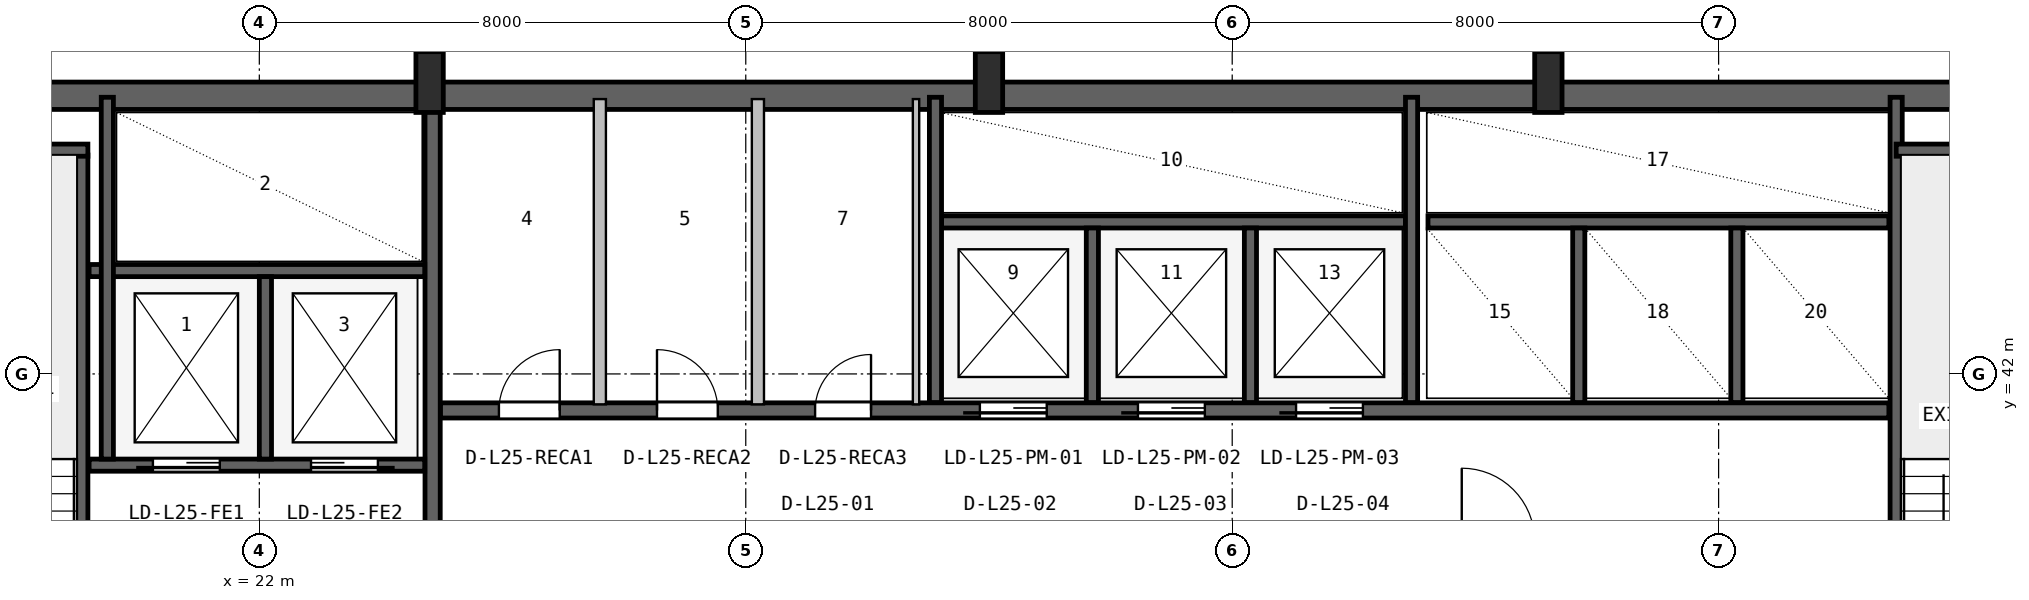
"""IFC4 building model, lengths in metres.
Left out: names, types, materials, properties, quantities, classifications, styles, units other than length and angle.
Written with IfcOpenShell. Run it as: python <this file> out.ifc"""

import sys

from ifc_helpers import new_model, si_unit, direction, frame, frame_2d, origin, origin_2d, place, context, subcontext, project, spatial, rectangle, i_section, extrude, source, transform, mapped, element, fill, save


model = new_model("IFC4")
c1 = context("Model", 3, precision=1e-05, world=origin(), true_north=direction((0.0, 1.0)))
c2 = subcontext(c1, "Body", "Model", "MODEL_VIEW")
j1 = project(units=[si_unit("LENGTHUNIT", "METRE"), si_unit("PLANEANGLEUNIT", "RADIAN")], contexts=[c1])
p1 = place(None, origin())
s1 = spatial("IfcSite", under=j1, at=p1, CompositionType="ELEMENT")
p2 = place(p1, origin())
s2 = spatial("IfcBuilding", under=s1, at=p2, CompositionType="ELEMENT")
p3 = place(p2, frame((0.0, 0.0, 106.8)))
s3 = spatial("IfcBuildingStorey", under=s2, at=p3, CompositionType="ELEMENT", Elevation=106.8)
p4 = place(p3, frame((15.6, 46.575, 0.0), z_axis=(0.0, 0.0, 1.0), x_axis=(1.0, 0.0, 0.0)))
e1 = element("IfcWall", 1, at=p4, inside=s3, PredefinedType="SHEAR", context=c2, shape_type="SweptSolid", body=[
    extrude(rectangle(XDim=36.8, YDim=0.45, at=frame_2d((18.4, 0.0))), origin(), (0.0, 0.0, 1.0), 3.55),
])
m1 = source(origin(), c2, "Body", "SweptSolid", [
    extrude(i_section(OverallWidth=0.45, OverallDepth=1.0, WebThickness=0.016, FlangeThickness=0.03, FilletRadius=0.016, at=origin_2d()), origin(), (0.0, 0.0, 1.0), 3.8),
])
for number, where, z_axis, x_axis in (
    (2, (24.8, 46.8, 0.0), (0.0, 0.0, 1.0), (1.0, 0.0, 0.0)),
    (3, (34.0, 46.8, 0.0), (0.0, 0.0, 1.0), (1.0, 0.0, 0.0)),
    (4, (43.2, 46.8, 0.0), (0.0, 0.0, 1.0), (1.0, 0.0, 0.0)),
):
    element("IfcColumn", number, at=place(p3, frame(where, z_axis=z_axis, x_axis=x_axis)), inside=s3, PredefinedType="COLUMN", context=c2, shape_type="MappedRepresentation", body=[
        mapped(m1, transform((0.0, 0.0, 0.0), x_axis=(1.0, 0.0, 0.0), y_axis=(0.0, 1.0, 0.0), z_axis=(0.0, 0.0, 1.0), scale=1.0)),
    ])
p5 = place(p3, frame((19.08, 35.95, 0.0), z_axis=(0.0, 0.0, 1.0), x_axis=(0.0, 1.0, 0.0)))
e5 = element("IfcWall", 5, at=p5, inside=s3, PredefinedType="SHEAR", context=c2, shape_type="SweptSolid", body=[
    extrude(rectangle(XDim=9.65, YDim=0.2, at=frame_2d((4.825, 0.0))), origin(), (0.0, 0.0, 1.0), 3.55),
])
p6 = place(p5, frame((0.25, 0.0, 0.0)))
e6 = element("IfcOpeningElement", 6, at=p6, cuts=e5, PredefinedType="OPENING", context=c2, shape_type="SweptSolid", body=[
    extrude(rectangle(XDim=0.95, YDim=2.1, at=frame_2d((0.475, 1.05))), frame((0.0, 0.11, 0.0), z_axis=(0.0, -1.0, 0.0), x_axis=(1.0, 0.0, 0.0)), (0.0, 0.0, 1.0), 0.22),
])
p7 = place(p3, frame((15.95, 45.68, 0.0), z_axis=(0.0, 0.0, 1.0), x_axis=(1.0, 0.0, 0.0)))
e7 = element("IfcWall", 7, at=p7, inside=s3, PredefinedType="SHEAR", context=c2, shape_type="SweptSolid", body=[
    extrude(rectangle(XDim=3.23, YDim=0.2, at=frame_2d((1.615, 0.0))), origin(), (0.0, 0.0, 1.0), 3.55),
])
p8 = place(p3, frame((24.85, 36.05, 0.0), z_axis=(0.0, 0.0, 1.0), x_axis=(0.0, 1.0, 0.0)))
e8 = element("IfcWall", 8, at=p8, inside=s3, PredefinedType="SHEAR", context=c2, shape_type="SweptSolid", body=[
    extrude(rectangle(XDim=10.45, YDim=0.25, at=frame_2d((5.225, 0.0))), origin(), (0.0, 0.0, 1.0), 3.55),
])
p9 = place(p3, frame((19.2, 40.5, 0.0), z_axis=(0.0, 0.0, 1.0), x_axis=(1.0, 0.0, 0.0)))
e9 = element("IfcWall", 9, at=p9, inside=s3, PredefinedType="SHEAR", context=c2, shape_type="SweptSolid", body=[
    extrude(rectangle(XDim=5.52, YDim=0.2, at=frame_2d((2.76, 0.0))), origin(), (0.0, 0.0, 1.0), 3.55),
])
p10 = place(p9, frame((1.05, 0.0, 0.0)))
e10 = element("IfcOpeningElement", 10, at=p10, cuts=e9, PredefinedType="OPENING", context=c2, shape_type="SweptSolid", body=[
    extrude(rectangle(XDim=1.1, YDim=2.18, at=frame_2d((0.55, 1.09))), frame((0.0, 0.11, 0.0), z_axis=(0.0, -1.0, 0.0), x_axis=(1.0, 0.0, 0.0)), (0.0, 0.0, 1.0), 0.22),
])
p11 = place(p9, frame((3.65, 0.0, 0.0)))
e11 = element("IfcOpeningElement", 11, at=p11, cuts=e9, PredefinedType="OPENING", context=c2, shape_type="SweptSolid", body=[
    extrude(rectangle(XDim=1.1, YDim=2.18, at=frame_2d((0.55, 1.09))), frame((0.0, 0.11, 0.0), z_axis=(0.0, -1.0, 0.0), x_axis=(1.0, 0.0, 0.0)), (0.0, 0.0, 1.0), 0.22),
])
p12 = place(p3, frame((19.2, 43.7, 0.0), z_axis=(0.0, 0.0, 1.0), x_axis=(1.0, 0.0, 0.0)))
e12 = element("IfcWall", 12, at=p12, inside=s3, PredefinedType="SHEAR", context=c2, shape_type="SweptSolid", body=[
    extrude(rectangle(XDim=5.52, YDim=0.2, at=frame_2d((2.76, 0.0))), origin(), (0.0, 0.0, 1.0), 3.55),
])
p13 = place(p3, frame((22.1, 40.6, 0.0), z_axis=(0.0, 0.0, 1.0), x_axis=(0.0, 1.0, 0.0)))
e13 = element("IfcWall", 13, at=p13, inside=s3, PredefinedType="SHEAR", context=c2, shape_type="SweptSolid", body=[
    extrude(rectangle(XDim=3.0, YDim=0.2, at=frame_2d((1.5, 0.0))), origin(), (0.0, 0.0, 1.0), 3.55),
])
p14 = place(p3, frame((19.5, 40.6, 0.0), z_axis=(0.0, 0.0, 1.0), x_axis=(0.0, 1.0, 0.0)))
e14 = element("IfcWall", 14, at=p14, inside=s3, PredefinedType="SHEAR", context=c2, shape_type="SweptSolid", body=[
    extrude(rectangle(XDim=5.95, YDim=0.2, at=frame_2d((2.975, 0.0))), origin(), (0.0, 0.0, 1.0), 3.55),
])
p15 = place(p3, frame((48.92, 36.05, 0.0), z_axis=(0.0, 0.0, 1.0), x_axis=(0.0, 1.0, 0.0)))
e15 = element("IfcWall", 15, at=p15, inside=s3, PredefinedType="SHEAR", context=c2, shape_type="SweptSolid", body=[
    extrude(rectangle(XDim=10.5, YDim=0.2, at=frame_2d((5.25, 0.0))), origin(), (0.0, 0.0, 1.0), 3.55),
])
p16 = place(p3, frame((48.92, 45.68, 0.0), z_axis=(0.0, 0.0, 1.0), x_axis=(1.0, 0.0, 0.0)))
e16 = element("IfcWall", 16, at=p16, inside=s3, PredefinedType="SHEAR", context=c2, shape_type="SweptSolid", body=[
    extrude(rectangle(XDim=3.18, YDim=0.2, at=frame_2d((1.59, 0.0))), origin(), (0.0, 0.0, 1.0), 3.55),
])
p17 = place(p3, frame((24.98, 41.4, 0.0), z_axis=(0.0, 0.0, 1.0), x_axis=(1.0, 0.0, 0.0)))
e17 = element("IfcWall", 17, at=p17, inside=s3, PredefinedType="SHEAR", context=c2, shape_type="SweptSolid", body=[
    extrude(rectangle(XDim=23.82, YDim=0.25, at=frame_2d((11.91, 0.0))), origin(), (0.0, 0.0, 1.0), 3.55),
])
p18 = place(p17, frame((8.87, 0.0, 0.0)))
e18 = element("IfcOpeningElement", 18, at=p18, cuts=e17, PredefinedType="OPENING", context=c2, shape_type="SweptSolid", body=[
    extrude(rectangle(XDim=1.1, YDim=2.18, at=frame_2d((0.55, 1.09))), frame((0.0, 0.135, 0.0), z_axis=(0.0, -1.0, 0.0), x_axis=(1.0, 0.0, 0.0)), (0.0, 0.0, 1.0), 0.27),
])
p19 = place(p17, frame((11.47, 0.0, 0.0)))
e19 = element("IfcOpeningElement", 19, at=p19, cuts=e17, PredefinedType="OPENING", context=c2, shape_type="SweptSolid", body=[
    extrude(rectangle(XDim=1.1, YDim=2.18, at=frame_2d((0.55, 1.09))), frame((0.0, 0.135, 0.0), z_axis=(0.0, -1.0, 0.0), x_axis=(1.0, 0.0, 0.0)), (0.0, 0.0, 1.0), 0.27),
])
p20 = place(p17, frame((14.07, 0.0, 0.0)))
e20 = element("IfcOpeningElement", 20, at=p20, cuts=e17, PredefinedType="OPENING", context=c2, shape_type="SweptSolid", body=[
    extrude(rectangle(XDim=1.1, YDim=2.18, at=frame_2d((0.55, 1.09))), frame((0.0, 0.135, 0.0), z_axis=(0.0, -1.0, 0.0), x_axis=(1.0, 0.0, 0.0)), (0.0, 0.0, 1.0), 0.27),
])
p21 = place(p17, frame((0.96, 0.0, 0.0)))
e21 = element("IfcOpeningElement", 21, at=p21, cuts=e17, PredefinedType="OPENING", context=c2, shape_type="SweptSolid", body=[
    extrude(rectangle(XDim=1.0, YDim=2.08, at=frame_2d((0.5, 1.04))), frame((0.0, 0.135, 0.0), z_axis=(0.0, -1.0, 0.0), x_axis=(1.0, 0.0, 0.0)), (0.0, 0.0, 1.0), 0.27),
])
p22 = place(p17, frame((3.56, 0.0, 0.0)))
e22 = element("IfcOpeningElement", 22, at=p22, cuts=e17, PredefinedType="OPENING", context=c2, shape_type="SweptSolid", body=[
    extrude(rectangle(XDim=1.0, YDim=2.08, at=frame_2d((0.5, 1.04))), frame((0.0, 0.135, 0.0), z_axis=(0.0, -1.0, 0.0), x_axis=(1.0, 0.0, 0.0)), (0.0, 0.0, 1.0), 0.27),
])
p23 = place(p17, frame((6.16, 0.0, 0.0)))
e23 = element("IfcOpeningElement", 23, at=p23, cuts=e17, PredefinedType="OPENING", context=c2, shape_type="SweptSolid", body=[
    extrude(rectangle(XDim=0.92, YDim=2.08, at=frame_2d((0.46, 1.04))), frame((0.0, 0.135, 0.0), z_axis=(0.0, -1.0, 0.0), x_axis=(1.0, 0.0, 0.0)), (0.0, 0.0, 1.0), 0.27),
])
p24 = place(p3, frame((33.22, 44.5, 0.0), z_axis=(0.0, 0.0, 1.0), x_axis=(1.0, 0.0, 0.0)))
e24 = element("IfcWall", 24, at=p24, inside=s3, PredefinedType="SHEAR", context=c2, shape_type="SweptSolid", body=[
    extrude(rectangle(XDim=7.63, YDim=0.2, at=frame_2d((3.815, 0.0))), origin(), (0.0, 0.0, 1.0), 3.55),
])
p25 = place(p3, frame((33.12, 41.53, 0.0), z_axis=(0.0, 0.0, 1.0), x_axis=(0.0, 1.0, 0.0)))
e25 = element("IfcWall", 25, at=p25, inside=s3, PredefinedType="SHEAR", context=c2, shape_type="SweptSolid", body=[
    extrude(rectangle(XDim=5.02, YDim=0.2, at=frame_2d((2.51, 0.0))), origin(), (0.0, 0.0, 1.0), 3.55),
])
for number, where, z_axis, x_axis in (
    (26, (35.7, 41.53, 0.0), (0.0, 0.0, 1.0), (0.0, 1.0, 0.0)),
    (27, (38.3, 41.53, 0.0), (0.0, 0.0, 1.0), (0.0, 1.0, 0.0)),
):
    element("IfcWall", number, at=place(p3, frame(where, z_axis=z_axis, x_axis=x_axis)), inside=s3, PredefinedType="SHEAR", context=c2, shape_type="SweptSolid", body=[
        extrude(rectangle(XDim=2.87, YDim=0.2, at=frame_2d((1.435, 0.0))), origin(), (0.0, 0.0, 1.0), 3.55),
    ])
p26 = place(p3, frame((40.95, 41.53, 0.0), z_axis=(0.0, 0.0, 1.0), x_axis=(0.0, 1.0, 0.0)))
e28 = element("IfcWall", 28, at=p26, inside=s3, PredefinedType="SHEAR", context=c2, shape_type="SweptSolid", body=[
    extrude(rectangle(XDim=5.02, YDim=0.2, at=frame_2d((2.51, 0.0))), origin(), (0.0, 0.0, 1.0), 3.55),
])
p27 = place(p3, frame((41.22, 44.5, 0.0), z_axis=(0.0, 0.0, 1.0), x_axis=(1.0, 0.0, 0.0)))
e29 = element("IfcWall", 29, at=p27, inside=s3, PredefinedType="SHEAR", context=c2, shape_type="SweptSolid", body=[
    extrude(rectangle(XDim=7.58, YDim=0.2, at=frame_2d((3.79, 0.0))), origin(), (0.0, 0.0, 1.0), 3.55),
])
for number, where, z_axis, x_axis in (
    (30, (43.7, 41.53, 0.0), (0.0, 0.0, 1.0), (0.0, 1.0, 0.0)),
    (31, (46.3, 41.53, 0.0), (0.0, 0.0, 1.0), (0.0, 1.0, 0.0)),
):
    element("IfcWall", number, at=place(p3, frame(where, z_axis=z_axis, x_axis=x_axis)), inside=s3, PredefinedType="SHEAR", context=c2, shape_type="SweptSolid", body=[
        extrude(rectangle(XDim=2.87, YDim=0.2, at=frame_2d((1.435, 0.0))), origin(), (0.0, 0.0, 1.0), 3.55),
    ])
for number, where, z_axis, x_axis in (
    (32, (27.6, 41.5, 0.0), (0.0, 0.0, 1.0), (0.0, 1.0, 0.0)),
    (33, (30.2, 41.5, 0.0), (0.0, 0.0, 1.0), (0.0, 1.0, 0.0)),
):
    element("IfcWall", number, at=place(p3, frame(where, z_axis=z_axis, x_axis=x_axis)), inside=s3, PredefinedType="SOLIDWALL", context=c2, shape_type="SweptSolid", body=[
        extrude(rectangle(XDim=5.02, YDim=0.2, at=frame_2d((2.51, 0.0))), origin(), (0.0, 0.0, 1.0), 3.53),
    ])
p28 = place(p3, frame((32.8, 41.5, 0.0), z_axis=(0.0, 0.0, 1.0), x_axis=(0.0, 1.0, 0.0)))
e34 = element("IfcWall", 34, at=p28, inside=s3, PredefinedType="PARTITIONING", context=c2, shape_type="SweptSolid", body=[
    extrude(rectangle(XDim=5.02, YDim=0.105, at=frame_2d((2.51, 0.0))), origin(), (0.0, 0.0, 1.0), 3.53),
])
m2 = source(origin(), c2, "Body", "SweptSolid", [
    extrude(rectangle(XDim=1.1, YDim=2.18, at=frame_2d((0.55, 1.09))), frame((0.0, 0.025, 0.0), z_axis=(0.0, -1.0, 0.0), x_axis=(1.0, 0.0, 0.0)), (0.0, 0.0, 1.0), 0.05),
])
p29 = place(p10, frame((1.1, 0.0, 0.0), z_axis=(0.0, 0.0, 1.0), x_axis=(-1.0, 0.0, 0.0)))
e35 = element("IfcDoor", 35, at=p29, inside=s3, OperationType="SLIDING_TO_LEFT", PredefinedType="DOOR", context=c2, shape_type="MappedRepresentation", body=[
    mapped(m2, transform((0.0, 0.0, 0.0), x_axis=(1.0, 0.0, 0.0), y_axis=(0.0, 1.0, 0.0), z_axis=(0.0, 0.0, 1.0), scale=1.0)),
])
fill(e10, e35)
p30 = place(p11, frame((1.1, 0.0, 0.0), z_axis=(0.0, 0.0, 1.0), x_axis=(-1.0, 0.0, 0.0)))
e36 = element("IfcDoor", 36, at=p30, inside=s3, OperationType="SLIDING_TO_RIGHT", PredefinedType="DOOR", context=c2, shape_type="MappedRepresentation", body=[
    mapped(m2, transform((0.0, 0.0, 0.0), x_axis=(1.0, 0.0, 0.0), y_axis=(0.0, 1.0, 0.0), z_axis=(0.0, 0.0, 1.0), scale=1.0)),
])
fill(e11, e36)
p31 = place(p18, frame((1.1, 0.0, 0.0), z_axis=(0.0, 0.0, 1.0), x_axis=(-1.0, 0.0, 0.0)))
e37 = element("IfcDoor", 37, at=p31, inside=s3, OperationType="SLIDING_TO_LEFT", PredefinedType="DOOR", context=c2, shape_type="MappedRepresentation", body=[
    mapped(m2, transform((0.0, 0.0, 0.0), x_axis=(1.0, 0.0, 0.0), y_axis=(0.0, 1.0, 0.0), z_axis=(0.0, 0.0, 1.0), scale=1.0)),
])
fill(e18, e37)
p32 = place(p19, frame((1.1, 0.0, 0.0), z_axis=(0.0, 0.0, 1.0), x_axis=(-1.0, 0.0, 0.0)))
e38 = element("IfcDoor", 38, at=p32, inside=s3, OperationType="SLIDING_TO_LEFT", PredefinedType="DOOR", context=c2, shape_type="MappedRepresentation", body=[
    mapped(m2, transform((0.0, 0.0, 0.0), x_axis=(1.0, 0.0, 0.0), y_axis=(0.0, 1.0, 0.0), z_axis=(0.0, 0.0, 1.0), scale=1.0)),
])
fill(e19, e38)
p33 = place(p20, frame((1.1, 0.0, 0.0), z_axis=(0.0, 0.0, 1.0), x_axis=(-1.0, 0.0, 0.0)))
e39 = element("IfcDoor", 39, at=p33, inside=s3, OperationType="SLIDING_TO_LEFT", PredefinedType="DOOR", context=c2, shape_type="MappedRepresentation", body=[
    mapped(m2, transform((0.0, 0.0, 0.0), x_axis=(1.0, 0.0, 0.0), y_axis=(0.0, 1.0, 0.0), z_axis=(0.0, 0.0, 1.0), scale=1.0)),
])
fill(e20, e39)
m3 = source(origin(), c2, "Body", "SweptSolid", [
    extrude(rectangle(XDim=1.0, YDim=2.08, at=frame_2d((0.5, 1.04))), frame((0.0, 0.025, 0.0), z_axis=(0.0, -1.0, 0.0), x_axis=(1.0, 0.0, 0.0)), (0.0, 0.0, 1.0), 0.05),
])
p34 = place(p21, origin())
e40 = element("IfcDoor", 40, at=p34, inside=s3, OperationType="SINGLE_SWING_RIGHT", PredefinedType="DOOR", context=c2, shape_type="MappedRepresentation", body=[
    mapped(m3, transform((0.0, 0.0, 0.0), x_axis=(1.0, 0.0, 0.0), y_axis=(0.0, 1.0, 0.0), z_axis=(0.0, 0.0, 1.0), scale=1.0)),
])
fill(e21, e40)
p35 = place(p22, origin())
e41 = element("IfcDoor", 41, at=p35, inside=s3, OperationType="SINGLE_SWING_LEFT", PredefinedType="DOOR", context=c2, shape_type="MappedRepresentation", body=[
    mapped(m3, transform((0.0, 0.0, 0.0), x_axis=(1.0, 0.0, 0.0), y_axis=(0.0, 1.0, 0.0), z_axis=(0.0, 0.0, 1.0), scale=1.0)),
])
fill(e22, e41)
m4 = source(origin(), c2, "Body", "SweptSolid", [
    extrude(rectangle(XDim=0.92, YDim=2.08, at=frame_2d((0.46, 1.04))), frame((0.0, 0.025, 0.0), z_axis=(0.0, -1.0, 0.0), x_axis=(1.0, 0.0, 0.0)), (0.0, 0.0, 1.0), 0.05),
])
p36 = place(p23, origin())
e42 = element("IfcDoor", 42, at=p36, inside=s3, OperationType="SINGLE_SWING_RIGHT", PredefinedType="DOOR", context=c2, shape_type="MappedRepresentation", body=[
    mapped(m4, transform((0.0, 0.0, 0.0), x_axis=(1.0, 0.0, 0.0), y_axis=(0.0, 1.0, 0.0), z_axis=(0.0, 0.0, 1.0), scale=1.0)),
])
fill(e23, e42)
save(model, sys.argv[1])
